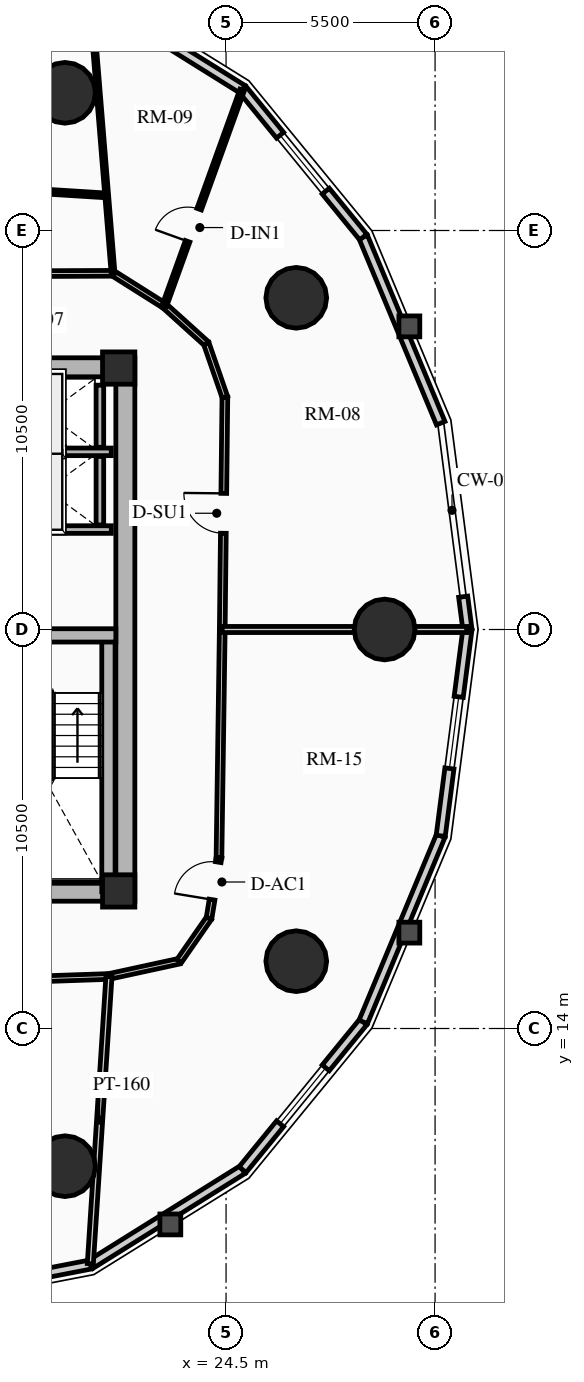
"""IFC4 building model, lengths in metres.
Left out: names, types, materials, properties, quantities, classifications, styles, units other than length and angle.
Written with IfcOpenShell. Run it as: python <this file> out.ifc"""

import sys

from ifc_helpers import new_model, si_unit, direction, frame, frame_2d, origin, origin_2d, place, context, subcontext, project, spatial, rectangle, circle, extrude, source, transform, mapped, element, fill, save


model = new_model("IFC4")
c1 = context("Model", 3, precision=1e-05, world=origin(), true_north=direction((0.0, 1.0)))
c2 = subcontext(c1, "Body", "Model", "MODEL_VIEW")
j1 = project(units=[si_unit("LENGTHUNIT", "METRE"), si_unit("PLANEANGLEUNIT", "RADIAN")], contexts=[c1])
p1 = place(None, origin())
s1 = spatial("IfcSite", under=j1, at=p1, CompositionType="ELEMENT")
p2 = place(p1, origin())
s2 = spatial("IfcBuilding", under=s1, at=p2, CompositionType="ELEMENT")
p3 = place(p2, frame((0.0, 0.0, 24.91)))
s3 = spatial("IfcBuildingStorey", under=s2, at=p3, CompositionType="ELEMENT", Elevation=24.91)
p4 = place(p3, frame((21.85, 17.35, 0.0), z_axis=(0.0, 0.0, 1.0), x_axis=(0.0, 1.0, 0.0)))
e1 = element("IfcWall", 1, at=p4, inside=s3, PredefinedType="SHEAR", context=c2, shape_type="SweptSolid", body=[
    extrude(rectangle(XDim=14.3, YDim=0.5, at=frame_2d((7.15, 0.0))), origin(), (0.0, 0.0, 1.0), 2.91),
])
p5 = place(p3, frame((11.15, 17.6, 0.0), z_axis=(0.0, 0.0, 1.0), x_axis=(1.0, 0.0, 0.0)))
e2 = element("IfcWall", 2, at=p5, inside=s3, PredefinedType="SHEAR", context=c2, shape_type="SweptSolid", body=[
    extrude(rectangle(XDim=10.7, YDim=0.5, at=frame_2d((5.35, 0.0))), origin(), (0.0, 0.0, 1.0), 2.91),
])
m1 = source(origin(), c2, "Body", "SweptSolid", [
    extrude(rectangle(XDim=1.5, YDim=2.02, at=frame_2d((0.75, 1.01))), frame((0.0, 0.26, 0.0), z_axis=(0.0, -1.0, 0.0), x_axis=(1.0, 0.0, 0.0)), (0.0, 0.0, 1.0), 0.52),
])
p6 = place(p5, frame((5.45, 0.0, 0.0)))
e3 = element("IfcOpeningElement", 3, at=p6, cuts=e2, PredefinedType="OPENING", context=c2, shape_type="MappedRepresentation", body=[
    mapped(m1, transform((0.0, 0.0, 0.0), x_axis=(1.0, 0.0, 0.0), y_axis=(0.0, 1.0, 0.0), z_axis=(0.0, 0.0, 1.0), scale=1.0)),
])
p7 = place(p3, frame((11.15, 31.4, 0.0), z_axis=(0.0, 0.0, 1.0), x_axis=(1.0, 0.0, 0.0)))
e4 = element("IfcWall", 4, at=p7, inside=s3, PredefinedType="SHEAR", context=c2, shape_type="SweptSolid", body=[
    extrude(rectangle(XDim=10.7, YDim=0.5, at=frame_2d((5.35, 0.0))), origin(), (0.0, 0.0, 1.0), 2.91),
])
p8 = place(p7, frame((4.6, 0.0, 0.0)))
e5 = element("IfcOpeningElement", 5, at=p8, cuts=e4, PredefinedType="OPENING", context=c2, shape_type="MappedRepresentation", body=[
    mapped(m1, transform((0.0, 0.0, 0.0), x_axis=(1.0, 0.0, 0.0), y_axis=(0.0, 1.0, 0.0), z_axis=(0.0, 0.0, 1.0), scale=1.0)),
])
p9 = place(p3, frame((21.405, 17.6, 0.0), z_axis=(0.0, 0.0, 1.0), x_axis=(0.0, 1.0, 0.0)))
e6 = element("IfcWall", 6, at=p9, inside=s3, PredefinedType="SHEAR", context=c2, shape_type="SweptSolid", body=[
    extrude(rectangle(XDim=6.745, YDim=0.35, at=frame_2d((3.373, 0.0))), origin(), (0.0, 0.0, 1.0), 2.91),
])
p10 = place(p3, frame((18.315, 24.345, 0.0), z_axis=(0.0, 0.0, 1.0), x_axis=(1.0, 0.0, 0.0)))
e7 = element("IfcWall", 7, at=p10, inside=s3, PredefinedType="SHEAR", context=c2, shape_type="SweptSolid", body=[
    extrude(rectangle(XDim=3.285, YDim=0.35, at=frame_2d((1.643, 0.0))), origin(), (0.0, 0.0, 1.0), 2.91),
])
for number, where, z_axis, x_axis in (
    (8, (21.675, 17.62, 0.0), (0.0, 0.0, 1.0), (1.0, 0.0, 0.0)),
    (9, (21.675, 31.38, 0.0), (0.0, 0.0, 1.0), (1.0, 0.0, 0.0)),
):
    element("IfcColumn", number, at=place(p3, frame(where, z_axis=z_axis, x_axis=x_axis)), inside=s3, PredefinedType="COLUMN", context=c2, shape_type="SweptSolid", body=[
        extrude(rectangle(XDim=0.85, YDim=0.85, at=origin_2d()), origin(), (0.0, 0.0, 1.0), 2.91),
    ])
for number, where, z_axis, x_axis in (
    (10, (28.672, 24.5, 0.0), (0.0, 0.0, 1.0), (1.0, 0.0, 0.0)),
    (11, (26.347, 33.229, 0.0), (0.0, 0.0, 1.0), (1.0, 0.0, 0.0)),
    (12, (20.261, 38.623, 0.0), (0.0, 0.0, 1.0), (1.0, 0.0, 0.0)),
    (13, (20.261, 10.377, 0.0), (0.0, 0.0, 1.0), (1.0, 0.0, 0.0)),
    (14, (26.347, 15.771, 0.0), (0.0, 0.0, 1.0), (1.0, 0.0, 0.0)),
):
    element("IfcColumn", number, at=place(p3, frame(where, z_axis=z_axis, x_axis=x_axis)), inside=s3, PredefinedType="USERDEFINED", context=c2, shape_type="SweptSolid", body=[
        extrude(circle(Radius=0.8, at=origin_2d()), origin(), (0.0, 0.0, 1.0), 2.91),
    ])
p11 = place(p3, frame((30.739, 25.363, 0.0), z_axis=(0.0, 0.0, 1.0), x_axis=(0.128523364007, -0.991706481225, 0.0)))
e15 = element("IfcWall", 15, at=p11, inside=s3, PredefinedType="SOLIDWALL", context=c2, shape_type="SweptSolid", body=[
    extrude(rectangle(XDim=0.87, YDim=0.24, at=frame_2d((0.435, 0.0))), origin(), (0.0, 0.0, 1.0), 2.635),
])
p12 = place(p3, frame((28.11, 34.827, 0.0), z_axis=(0.0, 0.0, 1.0), x_axis=(0.384255919668, -0.923226618009, 0.0)))
e16 = element("IfcWall", 16, at=p12, inside=s3, PredefinedType="SOLIDWALL", context=c2, shape_type="SweptSolid", body=[
    extrude(rectangle(XDim=5.305, YDim=0.24, at=frame_2d((2.653, 0.0))), origin(), (0.0, 0.0, 1.0), 2.073),
])
p13 = place(p3, frame((24.935, 38.714, 0.0), z_axis=(0.0, 0.0, 1.0), x_axis=(0.632588557044, -0.774488035735, 0.0)))
e17 = element("IfcWall", 17, at=p13, inside=s3, PredefinedType="SOLIDWALL", context=c2, shape_type="SweptSolid", body=[
    extrude(rectangle(XDim=5.019, YDim=0.24, at=frame_2d((2.509, 0.0))), origin(), (0.0, 0.0, 1.0), 2.073),
])
m2 = source(origin(), c2, "Body", "SweptSolid", [
    extrude(rectangle(XDim=1.9, YDim=1.35, at=frame_2d((0.95, 0.675))), frame((0.0, 0.13, 0.0), z_axis=(0.0, -1.0, 0.0), x_axis=(1.0, 0.0, 0.0)), (0.0, 0.0, 1.0), 0.26),
])
p14 = place(p13, frame((1.559, 0.0, 0.65)))
e18 = element("IfcOpeningElement", 18, at=p14, cuts=e17, PredefinedType="OPENING", context=c2, shape_type="MappedRepresentation", body=[
    mapped(m2, transform((0.0, 0.0, 0.0), x_axis=(1.0, 0.0, 0.0), y_axis=(0.0, 1.0, 0.0), z_axis=(0.0, 0.0, 1.0), scale=1.0)),
])
p15 = place(p3, frame((20.935, 41.21, 0.0), z_axis=(0.0, 0.0, 1.0), x_axis=(0.848422721916, -0.529319265601, 0.0)))
e19 = element("IfcWall", 19, at=p15, inside=s3, PredefinedType="SOLIDWALL", context=c2, shape_type="SweptSolid", body=[
    extrude(rectangle(XDim=4.715, YDim=0.24, at=frame_2d((2.357, 0.0))), origin(), (0.0, 0.0, 1.0), 2.073),
])
p16 = place(p3, frame((20.935, 7.79, 0.0), z_axis=(0.0, 0.0, 1.0), x_axis=(-0.981717351035, -0.190344536766, 0.0)))
e20 = element("IfcWall", 20, at=p16, inside=s3, PredefinedType="SOLIDWALL", context=c2, shape_type="SweptSolid", body=[
    extrude(rectangle(XDim=4.517, YDim=0.24, at=frame_2d((2.259, 0.0))), origin(), (0.0, 0.0, 1.0), 2.073),
])
m3 = source(origin(), c2, "Body", "SweptSolid", [
    extrude(rectangle(XDim=2.2, YDim=1.35, at=frame_2d((1.1, 0.675))), frame((0.0, 0.13, 0.0), z_axis=(0.0, -1.0, 0.0), x_axis=(1.0, 0.0, 0.0)), (0.0, 0.0, 1.0), 0.26),
])
p17 = place(p16, frame((1.159, 0.0, 0.65)))
e21 = element("IfcOpeningElement", 21, at=p17, cuts=e20, PredefinedType="OPENING", context=c2, shape_type="MappedRepresentation", body=[
    mapped(m3, transform((0.0, 0.0, 0.0), x_axis=(1.0, 0.0, 0.0), y_axis=(0.0, 1.0, 0.0), z_axis=(0.0, 0.0, 1.0), scale=1.0)),
])
p18 = place(p3, frame((24.935, 10.286, 0.0), z_axis=(0.0, 0.0, 1.0), x_axis=(-0.848422721916, -0.529319265601, 0.0)))
e22 = element("IfcWall", 22, at=p18, inside=s3, PredefinedType="SOLIDWALL", context=c2, shape_type="SweptSolid", body=[
    extrude(rectangle(XDim=4.715, YDim=0.24, at=frame_2d((2.357, 0.0))), origin(), (0.0, 0.0, 1.0), 2.073),
])
p19 = place(p3, frame((28.11, 14.173, 0.0), z_axis=(0.0, 0.0, 1.0), x_axis=(-0.632588557044, -0.774488035735, 0.0)))
e23 = element("IfcWall", 23, at=p19, inside=s3, PredefinedType="SOLIDWALL", context=c2, shape_type="SweptSolid", body=[
    extrude(rectangle(XDim=5.019, YDim=0.24, at=frame_2d((2.509, 0.0))), origin(), (0.0, 0.0, 1.0), 2.073),
])
p20 = place(p19, frame((1.559, 0.0, 0.65)))
e24 = element("IfcOpeningElement", 24, at=p20, cuts=e23, PredefinedType="OPENING", context=c2, shape_type="MappedRepresentation", body=[
    mapped(m2, transform((0.0, 0.0, 0.0), x_axis=(1.0, 0.0, 0.0), y_axis=(0.0, 1.0, 0.0), z_axis=(0.0, 0.0, 1.0), scale=1.0)),
])
p21 = place(p3, frame((30.149, 19.071, 0.0), z_axis=(0.0, 0.0, 1.0), x_axis=(-0.384255919668, -0.923226618009, 0.0)))
e25 = element("IfcWall", 25, at=p21, inside=s3, PredefinedType="SOLIDWALL", context=c2, shape_type="SweptSolid", body=[
    extrude(rectangle(XDim=5.305, YDim=0.24, at=frame_2d((2.653, 0.0))), origin(), (0.0, 0.0, 1.0), 2.073),
])
p22 = place(p3, frame((30.851, 24.5, 0.0), z_axis=(0.0, 0.0, 1.0), x_axis=(-0.128298189174, -0.991735637483, 0.0)))
e26 = element("IfcWall", 26, at=p22, inside=s3, PredefinedType="SOLIDWALL", context=c2, shape_type="SweptSolid", body=[
    extrude(rectangle(XDim=5.475, YDim=0.24, at=frame_2d((2.737, 0.0))), origin(), (0.0, 0.0, 1.0), 2.073),
])
p23 = place(p22, frame((1.787, 0.0, 0.65)))
e27 = element("IfcOpeningElement", 27, at=p23, cuts=e26, PredefinedType="OPENING", context=c2, shape_type="MappedRepresentation", body=[
    mapped(m2, transform((0.0, 0.0, 0.0), x_axis=(1.0, 0.0, 0.0), y_axis=(0.0, 1.0, 0.0), z_axis=(0.0, 0.0, 1.0), scale=1.0)),
])
for number, where, z_axis, x_axis in (
    (28, (18.51, 27.13, 0.0), (0.0, 0.0, 1.0), (1.0, 0.0, 0.0)),
    (29, (18.51, 29.175, 0.0), (0.0, 0.0, 1.0), (1.0, 0.0, 0.0)),
):
    element("IfcWall", number, at=place(p3, frame(where, z_axis=z_axis, x_axis=x_axis)), inside=s3, PredefinedType="SHEAR", context=c2, shape_type="SweptSolid", body=[
        extrude(rectangle(XDim=2.97, YDim=0.2, at=frame_2d((1.485, 0.0))), origin(), (0.0, 0.0, 1.0), 2.91),
    ])
p24 = place(p3, frame((21.18, 27.25, 0.0), z_axis=(0.0, 0.0, 1.0), x_axis=(0.0, 1.0, 0.0)))
e30 = element("IfcWall", 30, at=p24, inside=s3, PredefinedType="SHEAR", context=c2, shape_type="SweptSolid", body=[
    extrude(rectangle(XDim=1.805, YDim=0.2, at=frame_2d((0.902, 0.0))), origin(), (0.0, 0.0, 1.0), 2.91),
])
p25 = place(p3, frame((21.18, 29.295, 0.0), z_axis=(0.0, 0.0, 1.0), x_axis=(0.0, 1.0, 0.0)))
e31 = element("IfcWall", 31, at=p25, inside=s3, PredefinedType="SHEAR", context=c2, shape_type="SweptSolid", body=[
    extrude(rectangle(XDim=1.635, YDim=0.2, at=frame_2d((0.817, 0.0))), origin(), (0.0, 0.0, 1.0), 2.91),
])
p26 = place(p3, frame((24.4, 24.5, 0.0), z_axis=(0.0, 0.0, 1.0), x_axis=(0.011299841544, 0.999936154752, 0.0)))
e32 = element("IfcWall", 32, at=p26, inside=s3, PredefinedType="PARTITIONING", context=c2, shape_type="SweptSolid", body=[
    extrude(rectangle(XDim=6.115, YDim=0.15, at=frame_2d((3.057, 0.0))), origin(), (0.0, 0.0, 1.0), 2.159),
])
m4 = source(origin(), c2, "Body", "SweptSolid", [
    extrude(rectangle(XDim=1.05, YDim=2.015, at=frame_2d((0.525, 1.007))), frame((0.0, 0.085, 0.0), z_axis=(0.0, -1.0, 0.0), x_axis=(1.0, 0.0, 0.0)), (0.0, 0.0, 1.0), 0.17),
])
p27 = place(p26, frame((2.532, 0.0, 0.0)))
e33 = element("IfcOpeningElement", 33, at=p27, cuts=e32, PredefinedType="OPENING", context=c2, shape_type="MappedRepresentation", body=[
    mapped(m4, transform((0.0, 0.0, 0.0), x_axis=(1.0, 0.0, 0.0), y_axis=(0.0, 1.0, 0.0), z_axis=(0.0, 0.0, 1.0), scale=1.0)),
])
p28 = place(p3, frame((24.469, 30.614, 0.0), z_axis=(0.0, 0.0, 1.0), x_axis=(-0.327228335485, 0.944945298129, 0.0)))
e34 = element("IfcWall", 34, at=p28, inside=s3, PredefinedType="PARTITIONING", context=c2, shape_type="SweptSolid", body=[
    extrude(rectangle(XDim=1.495, YDim=0.15, at=frame_2d((0.748, 0.0))), origin(), (0.0, 0.0, 1.0), 2.205),
])
p29 = place(p3, frame((23.98, 32.027, 0.0), z_axis=(0.0, 0.0, 1.0), x_axis=(-0.742353224332, 0.670008724065, 0.0)))
e35 = element("IfcWall", 35, at=p29, inside=s3, PredefinedType="PARTITIONING", context=c2, shape_type="SweptSolid", body=[
    extrude(rectangle(XDim=1.485, YDim=0.15, at=frame_2d((0.742, 0.0))), origin(), (0.0, 0.0, 1.0), 2.159),
])
p30 = place(p3, frame((22.877, 33.022, 0.0), z_axis=(0.0, 0.0, 1.0), x_axis=(-0.845895608855, 0.533348496689, 0.0)))
e36 = element("IfcWall", 36, at=p30, inside=s3, PredefinedType="PARTITIONING", context=c2, shape_type="SweptSolid", body=[
    extrude(rectangle(XDim=1.597, YDim=0.15, at=frame_2d((0.798, 0.0))), origin(), (0.0, 0.0, 1.0), 2.205),
])
p31 = place(p3, frame((21.527, 33.873, 0.0), z_axis=(0.0, 0.0, 1.0), x_axis=(-0.999991838845, -0.004040079574, 0.0)))
e37 = element("IfcWall", 37, at=p31, inside=s3, PredefinedType="PARTITIONING", context=c2, shape_type="SweptSolid", body=[
    extrude(rectangle(XDim=3.384, YDim=0.15, at=frame_2d((1.692, 0.0))), origin(), (0.0, 0.0, 1.0), 2.159),
])
p32 = place(p3, frame((14.781, 15.141, 0.0), z_axis=(0.0, 0.0, 1.0), x_axis=(0.999407918707, 0.034406569513, 0.0)))
e38 = element("IfcWall", 38, at=p32, inside=s3, PredefinedType="PARTITIONING", context=c2, shape_type="SweptSolid", body=[
    extrude(rectangle(XDim=6.642, YDim=0.15, at=frame_2d((3.321, 0.0))), origin(), (0.0, 0.0, 1.0), 2.159),
])
p33 = place(p3, frame((21.419, 15.369, 0.0), z_axis=(0.0, 0.0, 1.0), x_axis=(0.977192701953, 0.212354475464, 0.0)))
e39 = element("IfcWall", 39, at=p33, inside=s3, PredefinedType="PARTITIONING", context=c2, shape_type="SweptSolid", body=[
    extrude(rectangle(XDim=1.888, YDim=0.15, at=frame_2d((0.944, 0.0))), origin(), (0.0, 0.0, 1.0), 2.205),
])
p34 = place(p3, frame((23.263, 15.77, 0.0), z_axis=(0.0, 0.0, 1.0), x_axis=(0.570743456919, 0.821128434768, 0.0)))
e40 = element("IfcWall", 40, at=p34, inside=s3, PredefinedType="PARTITIONING", context=c2, shape_type="SweptSolid", body=[
    extrude(rectangle(XDim=1.382, YDim=0.15, at=frame_2d((0.691, 0.0))), origin(), (0.0, 0.0, 1.0), 2.159),
])
p35 = place(p3, frame((24.052, 16.905, 0.0), z_axis=(0.0, 0.0, 1.0), x_axis=(0.162091534225, 0.986775726562, 0.0)))
e41 = element("IfcWall", 41, at=p35, inside=s3, PredefinedType="PARTITIONING", context=c2, shape_type="SweptSolid", body=[
    extrude(rectangle(XDim=1.613, YDim=0.15, at=frame_2d((0.807, 0.0))), origin(), (0.0, 0.0, 1.0), 2.205),
])
m5 = source(origin(), c2, "Body", "SweptSolid", [
    extrude(rectangle(XDim=1.0, YDim=2.015, at=frame_2d((0.5, 1.007))), frame((0.0, 0.085, 0.0), z_axis=(0.0, -1.0, 0.0), x_axis=(1.0, 0.0, 0.0)), (0.0, 0.0, 1.0), 0.17),
])
p36 = place(p35, frame((0.493, 0.0, 0.0)))
e42 = element("IfcOpeningElement", 42, at=p36, cuts=e41, PredefinedType="OPENING", context=c2, shape_type="MappedRepresentation", body=[
    mapped(m5, transform((0.0, 0.0, 0.0), x_axis=(1.0, 0.0, 0.0), y_axis=(0.0, 1.0, 0.0), z_axis=(0.0, 0.0, 1.0), scale=1.0)),
])
p37 = place(p3, frame((24.313, 18.496, 0.0), z_axis=(0.0, 0.0, 1.0), x_axis=(0.014394019188, 0.999896400739, 0.0)))
e43 = element("IfcWall", 43, at=p37, inside=s3, PredefinedType="PARTITIONING", context=c2, shape_type="SweptSolid", body=[
    extrude(rectangle(XDim=6.004, YDim=0.15, at=frame_2d((3.002, 0.0))), origin(), (0.0, 0.0, 1.0), 2.635),
])
p38 = place(p3, frame((24.4, 24.5, 0.0), z_axis=(0.0, 0.0, 1.0), x_axis=(1.0, 0.0, 0.0)))
e44 = element("IfcWall", 44, at=p38, inside=s3, PredefinedType="PARTITIONING", context=c2, shape_type="SweptSolid", body=[
    extrude(rectangle(XDim=6.431, YDim=0.16, at=frame_2d((3.216, 0.0))), origin(), (0.0, 0.0, 1.0), 2.073),
])
p39 = place(p3, frame((21.527, 33.873, 0.0), z_axis=(0.0, 0.0, 1.0), x_axis=(-0.081501553037, 0.996673214676, 0.0)))
e45 = element("IfcWall", 45, at=p39, inside=s3, PredefinedType="MOVABLE", context=c2, shape_type="SweptSolid", body=[
    extrude(rectangle(XDim=7.342, YDim=0.1, at=frame_2d((3.671, 0.0))), origin(), (0.0, 0.0, 1.0), 2.073),
])
p40 = place(p3, frame((21.419, 15.369, 0.0), z_axis=(0.0, 0.0, 1.0), x_axis=(-0.064709408161, -0.997904149954, 0.0)))
e46 = element("IfcWall", 46, at=p40, inside=s3, PredefinedType="PARTITIONING", context=c2, shape_type="SweptSolid", body=[
    extrude(rectangle(XDim=7.576, YDim=0.16, at=frame_2d((3.788, 0.0))), origin(), (0.0, 0.0, 1.0), 2.073),
])
p41 = place(p3, frame((22.877, 33.022, 0.0), z_axis=(0.0, 0.0, 1.0), x_axis=(0.339100549831, 0.94075013532, 0.0)))
e47 = element("IfcWall", 47, at=p41, inside=s3, PredefinedType="PARTITIONING", context=c2, shape_type="SweptSolid", body=[
    extrude(rectangle(XDim=6.034, YDim=0.125, at=frame_2d((3.017, 0.0))), origin(), (0.0, 0.0, 1.0), 2.073),
])
m6 = source(origin(), c2, "Body", "SweptSolid", [
    extrude(rectangle(XDim=0.9, YDim=2.005, at=frame_2d((0.45, 1.002))), frame((0.0, 0.073, 0.0), z_axis=(0.0, -1.0, 0.0), x_axis=(1.0, 0.0, 0.0)), (0.0, 0.0, 1.0), 0.145),
])
p42 = place(p41, frame((1.8, 0.0, 0.0)))
e48 = element("IfcOpeningElement", 48, at=p42, cuts=e47, PredefinedType="OPENING", context=c2, shape_type="MappedRepresentation", body=[
    mapped(m6, transform((0.0, 0.0, 0.0), x_axis=(1.0, 0.0, 0.0), y_axis=(0.0, 1.0, 0.0), z_axis=(0.0, 0.0, 1.0), scale=1.0)),
])
p43 = place(p3, frame((21.359, 35.922, 0.0), z_axis=(0.0, 0.0, 1.0), x_axis=(-0.998040956573, 0.062563959294, 0.0)))
e49 = element("IfcWall", 49, at=p43, inside=s3, PredefinedType="PARTITIONING", context=c2, shape_type="SweptSolid", body=[
    extrude(rectangle(XDim=3.684, YDim=0.125, at=frame_2d((1.842, 0.0))), origin(), (0.0, 0.0, 1.0), 2.159),
])
m7 = source(origin(), c2, "Body", "SweptSolid", [
    extrude(rectangle(XDim=1.9, YDim=1.35, at=frame_2d((0.95, 0.675))), frame((0.0, 0.03, 0.0), z_axis=(0.0, -1.0, 0.0), x_axis=(1.0, 0.0, 0.0)), (0.0, 0.0, 1.0), 0.06),
])
p44 = place(p14, origin())
e50 = element("IfcWindow", 50, at=p44, inside=s3, PartitioningType="DOUBLE_PANEL_VERTICAL", PredefinedType="WINDOW", context=c2, shape_type="MappedRepresentation", body=[
    mapped(m7, transform((0.0, 0.0, 0.0), x_axis=(1.0, 0.0, 0.0), y_axis=(0.0, 1.0, 0.0), z_axis=(0.0, 0.0, 1.0), scale=1.0)),
])
fill(e18, e50)
p45 = place(p20, origin())
e51 = element("IfcWindow", 51, at=p45, inside=s3, PartitioningType="DOUBLE_PANEL_VERTICAL", PredefinedType="WINDOW", context=c2, shape_type="MappedRepresentation", body=[
    mapped(m7, transform((0.0, 0.0, 0.0), x_axis=(1.0, 0.0, 0.0), y_axis=(0.0, 1.0, 0.0), z_axis=(0.0, 0.0, 1.0), scale=1.0)),
])
fill(e24, e51)
p46 = place(p23, origin())
e52 = element("IfcWindow", 52, at=p46, inside=s3, PartitioningType="DOUBLE_PANEL_VERTICAL", PredefinedType="WINDOW", context=c2, shape_type="MappedRepresentation", body=[
    mapped(m7, transform((0.0, 0.0, 0.0), x_axis=(1.0, 0.0, 0.0), y_axis=(0.0, 1.0, 0.0), z_axis=(0.0, 0.0, 1.0), scale=1.0)),
])
fill(e27, e52)
m8 = source(origin(), c2, "Body", "SweptSolid", [
    extrude(rectangle(XDim=1.05, YDim=2.015, at=frame_2d((0.525, 1.007))), frame((0.0, 0.025, 0.0), z_axis=(0.0, -1.0, 0.0), x_axis=(1.0, 0.0, 0.0)), (0.0, 0.0, 1.0), 0.05),
])
p47 = place(p27, origin())
e53 = element("IfcDoor", 53, at=p47, inside=s3, OperationType="SINGLE_SWING_RIGHT", PredefinedType="DOOR", context=c2, shape_type="MappedRepresentation", body=[
    mapped(m8, transform((0.0, 0.0, 0.0), x_axis=(1.0, 0.0, 0.0), y_axis=(0.0, 1.0, 0.0), z_axis=(0.0, 0.0, 1.0), scale=1.0)),
])
fill(e33, e53)
m9 = source(origin(), c2, "Body", "SweptSolid", [
    extrude(rectangle(XDim=0.9, YDim=2.005, at=frame_2d((0.45, 1.002))), frame((0.0, 0.025, 0.0), z_axis=(0.0, -1.0, 0.0), x_axis=(1.0, 0.0, 0.0)), (0.0, 0.0, 1.0), 0.05),
])
p48 = place(p42, origin())
e54 = element("IfcDoor", 54, at=p48, inside=s3, OperationType="SINGLE_SWING_LEFT", PredefinedType="DOOR", context=c2, shape_type="MappedRepresentation", body=[
    mapped(m9, transform((0.0, 0.0, 0.0), x_axis=(1.0, 0.0, 0.0), y_axis=(0.0, 1.0, 0.0), z_axis=(0.0, 0.0, 1.0), scale=1.0)),
])
fill(e48, e54)
m10 = source(origin(), c2, "Body", "SweptSolid", [
    extrude(rectangle(XDim=1.0, YDim=2.015, at=frame_2d((0.5, 1.007))), frame((0.0, 0.025, 0.0), z_axis=(0.0, -1.0, 0.0), x_axis=(1.0, 0.0, 0.0)), (0.0, 0.0, 1.0), 0.05),
])
p49 = place(p36, origin())
e55 = element("IfcDoor", 55, at=p49, inside=s3, OperationType="SINGLE_SWING_LEFT", PredefinedType="DOOR", context=c2, shape_type="MappedRepresentation", body=[
    mapped(m10, transform((0.0, 0.0, 0.0), x_axis=(1.0, 0.0, 0.0), y_axis=(0.0, 1.0, 0.0), z_axis=(0.0, 0.0, 1.0), scale=1.0)),
])
fill(e42, e55)
save(model, sys.argv[1])
